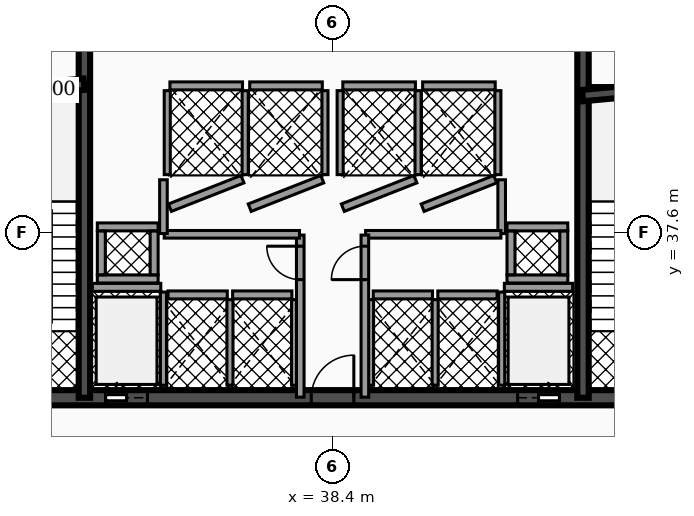
"""IFC4 building model, lengths in metres.
Left out: names, types, materials, properties, quantities, classifications, styles, units other than length and angle.
Written with IfcOpenShell. Run it as: python <this file> out.ifc"""

import sys

from ifc_helpers import new_model, si_unit, direction, frame, frame_2d, origin, place, context, subcontext, project, spatial, rectangle, extrude, element, fill, save


model = new_model("IFC4")
c1 = context("Model", 3, precision=1e-05, world=origin(), true_north=direction((0.0, 1.0)))
c2 = subcontext(c1, "Body", "Model", "MODEL_VIEW")
j1 = project(units=[si_unit("LENGTHUNIT", "METRE"), si_unit("PLANEANGLEUNIT", "RADIAN")], contexts=[c1])
p1 = place(None, origin())
s1 = spatial("IfcSite", under=j1, at=p1, CompositionType="ELEMENT")
p2 = place(p1, origin())
s2 = spatial("IfcBuilding", under=s1, at=p2, CompositionType="ELEMENT")
p3 = place(p2, frame((0.0, 0.0, 18.36)))
s3 = spatial("IfcBuildingStorey", under=s2, at=p3, CompositionType="ELEMENT", Elevation=18.36)
p4 = place(p3, frame((28.4, 33.25, 0.0), z_axis=(0.0, 0.0, 1.0), x_axis=(1.0, 0.0, 0.0)))
e1 = element("IfcWall", 1, at=p4, inside=s3, PredefinedType="SHEAR", context=c2, shape_type="SweptSolid", body=[
    extrude(rectangle(XDim=20.06, YDim=0.4, at=frame_2d((10.03, 0.0))), origin(), (0.0, 0.0, 1.0), 4.07),
])
p5 = place(p4, frame((4.03, 0.0, 0.0)))
e2 = element("IfcOpeningElement", 2, at=p5, cuts=e1, PredefinedType="OPENING", context=c2, shape_type="SweptSolid", body=[
    extrude(rectangle(XDim=1.1, YDim=2.15, at=frame_2d((0.55, 1.075))), frame((0.0, 0.21, 0.0), z_axis=(0.0, -1.0, 0.0), x_axis=(1.0, 0.0, 0.0)), (0.0, 0.0, 1.0), 0.42),
])
p6 = place(p4, frame((14.87, 0.0, 0.0)))
e3 = element("IfcOpeningElement", 3, at=p6, cuts=e1, PredefinedType="OPENING", context=c2, shape_type="SweptSolid", body=[
    extrude(rectangle(XDim=1.1, YDim=2.15, at=frame_2d((0.55, 1.075))), frame((0.0, 0.21, 0.0), z_axis=(0.0, -1.0, 0.0), x_axis=(1.0, 0.0, 0.0)), (0.0, 0.0, 1.0), 0.42),
])
p7 = place(p4, frame((1.31, 0.0, 0.0)))
e4 = element("IfcOpeningElement", 4, at=p7, cuts=e1, PredefinedType="OPENING", context=c2, shape_type="SweptSolid", body=[
    extrude(rectangle(XDim=1.1, YDim=2.2, at=frame_2d((0.55, 1.1))), frame((0.0, 0.21, 0.0), z_axis=(0.0, -1.0, 0.0), x_axis=(1.0, 0.0, 0.0)), (0.0, 0.0, 1.0), 0.42),
])
p8 = place(p4, frame((9.44, 0.0, 0.0)))
e5 = element("IfcOpeningElement", 5, at=p8, cuts=e1, PredefinedType="OPENING", context=c2, shape_type="SweptSolid", body=[
    extrude(rectangle(XDim=1.12, YDim=2.05, at=frame_2d((0.56, 1.025))), frame((0.0, 0.21, 0.0), z_axis=(0.0, -1.0, 0.0), x_axis=(1.0, 0.0, 0.0)), (0.0, 0.0, 1.0), 0.42),
])
p9 = place(p4, frame((17.65, 0.0, 0.0)))
e6 = element("IfcOpeningElement", 6, at=p9, cuts=e1, PredefinedType="OPENING", context=c2, shape_type="SweptSolid", body=[
    extrude(rectangle(XDim=1.1, YDim=2.2, at=frame_2d((0.55, 1.1))), frame((0.0, 0.21, 0.0), z_axis=(0.0, -1.0, 0.0), x_axis=(1.0, 0.0, 0.0)), (0.0, 0.0, 1.0), 0.42),
])
for number, where, z_axis, x_axis in (
    (7, (31.87, 33.25, 0.0), (0.0, 0.0, 1.0), (0.0, 1.0, 0.0)),
    (8, (44.99, 33.25, 0.0), (0.0, 0.0, 1.0), (0.0, 1.0, 0.0)),
):
    element("IfcWall", number, at=place(p3, frame(where, z_axis=z_axis, x_axis=x_axis)), inside=s3, PredefinedType="SHEAR", context=c2, shape_type="SweptSolid", body=[
        extrude(rectangle(XDim=10.2, YDim=0.3, at=frame_2d((5.1, 0.0))), origin(), (0.0, 0.0, 1.0), 4.07),
    ])
p10 = place(p3, frame((28.64, 41.2, 0.0), z_axis=(0.0, 0.0, 1.0), x_axis=(0.995687118776, 0.092774789157, 0.0)))
e9 = element("IfcWall", 9, at=p10, inside=s3, PredefinedType="SHEAR", context=c2, shape_type="SweptSolid", body=[
    extrude(rectangle(XDim=3.234, YDim=0.3, at=frame_2d((1.617, 0.0))), origin(), (0.0, 0.0, 1.0), 4.07),
])
p11 = place(p3, frame((44.98, 41.2, 0.0), z_axis=(0.0, 0.0, 1.0), x_axis=(0.995686468965, 0.09278176286, 0.0)))
e10 = element("IfcWall", 10, at=p11, inside=s3, PredefinedType="SHEAR", context=c2, shape_type="SweptSolid", body=[
    extrude(rectangle(XDim=3.234, YDim=0.3, at=frame_2d((1.617, 0.0))), origin(), (0.0, 0.0, 1.0), 4.07),
])
p12 = place(p3, frame((32.08, 36.155, 0.0), z_axis=(0.0, 0.0, 1.0), x_axis=(1.0, 0.0, 0.0)))
e11 = element("IfcWall", 11, at=p12, inside=s3, PredefinedType="SOLIDWALL", context=c2, shape_type="SweptSolid", body=[
    extrude(rectangle(XDim=1.8, YDim=0.21, at=frame_2d((0.9, 0.0))), origin(), (0.0, 0.0, 1.0), 3.042),
])
p13 = place(p3, frame((33.95, 33.58, 0.0), z_axis=(0.0, 0.0, 1.0), x_axis=(0.0, 1.0, 0.0)))
e12 = element("IfcWall", 12, at=p13, inside=s3, PredefinedType="SOLIDWALL", context=c2, shape_type="SweptSolid", body=[
    extrude(rectangle(XDim=2.45, YDim=0.16, at=frame_2d((1.225, 0.0))), origin(), (0.0, 0.0, 1.0), 3.042),
])
p14 = place(p3, frame((42.92, 36.155, 0.0), z_axis=(0.0, 0.0, 1.0), x_axis=(1.0, 0.0, 0.0)))
e13 = element("IfcWall", 13, at=p14, inside=s3, PredefinedType="SOLIDWALL", context=c2, shape_type="SweptSolid", body=[
    extrude(rectangle(XDim=1.8, YDim=0.21, at=frame_2d((0.9, 0.0))), origin(), (0.0, 0.0, 1.0), 3.042),
])
p15 = place(p3, frame((42.85, 33.58, 0.0), z_axis=(0.0, 0.0, 1.0), x_axis=(0.0, 1.0, 0.0)))
e14 = element("IfcWall", 14, at=p15, inside=s3, PredefinedType="SOLIDWALL", context=c2, shape_type="SweptSolid", body=[
    extrude(rectangle(XDim=2.45, YDim=0.16, at=frame_2d((1.225, 0.0))), origin(), (0.0, 0.0, 1.0), 3.042),
])
p16 = place(p3, frame((34.12, 38.25, 0.0), z_axis=(0.0, 0.0, 1.0), x_axis=(0.930804993012, 0.36551616241, 0.0)))
e15 = element("IfcWall", 15, at=p16, inside=s3, PredefinedType="SOLIDWALL", context=c2, shape_type="SweptSolid", body=[
    extrude(rectangle(XDim=2.052, YDim=0.21, at=frame_2d((1.026, 0.0))), origin(), (0.0, 0.0, 1.0), 3.042),
])
p17 = place(p3, frame((34.12, 41.455, 0.0), z_axis=(0.0, 0.0, 1.0), x_axis=(1.0, 0.0, 0.0)))
e16 = element("IfcWall", 16, at=p17, inside=s3, PredefinedType="SOLIDWALL", context=c2, shape_type="SweptSolid", body=[
    extrude(rectangle(XDim=1.91, YDim=0.21, at=frame_2d((0.955, 0.0))), origin(), (0.0, 0.0, 1.0), 3.042),
])
for number, where, z_axis, x_axis in (
    (17, (34.05, 39.12, 0.0), (0.0, 0.0, 1.0), (0.0, 1.0, 0.0)),
    (18, (36.1, 39.12, 0.0), (0.0, 0.0, 1.0), (0.0, 1.0, 0.0)),
):
    element("IfcWall", number, at=place(p3, frame(where, z_axis=z_axis, x_axis=x_axis)), inside=s3, PredefinedType="SOLIDWALL", context=c2, shape_type="SweptSolid", body=[
        extrude(rectangle(XDim=2.21, YDim=0.16, at=frame_2d((1.105, 0.0))), origin(), (0.0, 0.0, 1.0), 3.042),
    ])
p18 = place(p3, frame((36.22, 38.25, 0.0), z_axis=(0.0, 0.0, 1.0), x_axis=(0.930804993012, 0.36551616241, 0.0)))
e19 = element("IfcWall", 19, at=p18, inside=s3, PredefinedType="SOLIDWALL", context=c2, shape_type="SweptSolid", body=[
    extrude(rectangle(XDim=2.052, YDim=0.21, at=frame_2d((1.026, 0.0))), origin(), (0.0, 0.0, 1.0), 3.042),
])
p19 = place(p3, frame((36.22, 41.455, 0.0), z_axis=(0.0, 0.0, 1.0), x_axis=(1.0, 0.0, 0.0)))
e20 = element("IfcWall", 20, at=p19, inside=s3, PredefinedType="SOLIDWALL", context=c2, shape_type="SweptSolid", body=[
    extrude(rectangle(XDim=1.91, YDim=0.21, at=frame_2d((0.955, 0.0))), origin(), (0.0, 0.0, 1.0), 3.042),
])
p20 = place(p3, frame((38.2, 39.12, 0.0), z_axis=(0.0, 0.0, 1.0), x_axis=(0.0, 1.0, 0.0)))
e21 = element("IfcWall", 21, at=p20, inside=s3, PredefinedType="SOLIDWALL", context=c2, shape_type="SweptSolid", body=[
    extrude(rectangle(XDim=2.21, YDim=0.16, at=frame_2d((1.105, 0.0))), origin(), (0.0, 0.0, 1.0), 3.042),
])
p21 = place(p3, frame((38.67, 38.25, 0.0), z_axis=(0.0, 0.0, 1.0), x_axis=(0.930820886763, 0.3654756856, 0.0)))
e22 = element("IfcWall", 22, at=p21, inside=s3, PredefinedType="SOLIDWALL", context=c2, shape_type="SweptSolid", body=[
    extrude(rectangle(XDim=2.052, YDim=0.21, at=frame_2d((1.026, 0.0))), origin(), (0.0, 0.0, 1.0), 3.042),
])
p22 = place(p3, frame((38.67, 41.455, 0.0), z_axis=(0.0, 0.0, 1.0), x_axis=(1.0, 0.0, 0.0)))
e23 = element("IfcWall", 23, at=p22, inside=s3, PredefinedType="SOLIDWALL", context=c2, shape_type="SweptSolid", body=[
    extrude(rectangle(XDim=1.91, YDim=0.21, at=frame_2d((0.955, 0.0))), origin(), (0.0, 0.0, 1.0), 3.042),
])
for number, where, z_axis, x_axis in (
    (24, (38.6, 39.12, 0.0), (0.0, 0.0, 1.0), (0.0, 1.0, 0.0)),
    (25, (40.65, 39.12, 0.0), (0.0, 0.0, 1.0), (0.0, 1.0, 0.0)),
):
    element("IfcWall", number, at=place(p3, frame(where, z_axis=z_axis, x_axis=x_axis)), inside=s3, PredefinedType="SOLIDWALL", context=c2, shape_type="SweptSolid", body=[
        extrude(rectangle(XDim=2.21, YDim=0.16, at=frame_2d((1.105, 0.0))), origin(), (0.0, 0.0, 1.0), 3.042),
    ])
p23 = place(p3, frame((40.77, 38.25, 0.0), z_axis=(0.0, 0.0, 1.0), x_axis=(0.930804993012, 0.36551616241, 0.0)))
e26 = element("IfcWall", 26, at=p23, inside=s3, PredefinedType="SOLIDWALL", context=c2, shape_type="SweptSolid", body=[
    extrude(rectangle(XDim=2.052, YDim=0.21, at=frame_2d((1.026, 0.0))), origin(), (0.0, 0.0, 1.0), 3.042),
])
p24 = place(p3, frame((40.77, 41.455, 0.0), z_axis=(0.0, 0.0, 1.0), x_axis=(1.0, 0.0, 0.0)))
e27 = element("IfcWall", 27, at=p24, inside=s3, PredefinedType="SOLIDWALL", context=c2, shape_type="SweptSolid", body=[
    extrude(rectangle(XDim=1.91, YDim=0.21, at=frame_2d((0.955, 0.0))), origin(), (0.0, 0.0, 1.0), 3.042),
])
p25 = place(p3, frame((42.75, 39.12, 0.0), z_axis=(0.0, 0.0, 1.0), x_axis=(0.0, 1.0, 0.0)))
e28 = element("IfcWall", 28, at=p25, inside=s3, PredefinedType="SOLIDWALL", context=c2, shape_type="SweptSolid", body=[
    extrude(rectangle(XDim=2.21, YDim=0.16, at=frame_2d((1.105, 0.0))), origin(), (0.0, 0.0, 1.0), 3.042),
])
p26 = place(p3, frame((34.07, 35.955, 0.0), z_axis=(0.0, 0.0, 1.0), x_axis=(1.0, 0.0, 0.0)))
e29 = element("IfcWall", 29, at=p26, inside=s3, PredefinedType="SOLIDWALL", context=c2, shape_type="SweptSolid", body=[
    extrude(rectangle(XDim=1.56, YDim=0.21, at=frame_2d((0.78, 0.0))), origin(), (0.0, 0.0, 1.0), 3.042),
])
p27 = place(p3, frame((35.7, 33.58, 0.0), z_axis=(0.0, 0.0, 1.0), x_axis=(0.0, 1.0, 0.0)))
e30 = element("IfcWall", 30, at=p27, inside=s3, PredefinedType="SOLIDWALL", context=c2, shape_type="SweptSolid", body=[
    extrude(rectangle(XDim=2.25, YDim=0.16, at=frame_2d((1.125, 0.0))), origin(), (0.0, 0.0, 1.0), 3.042),
])
p28 = place(p3, frame((35.77, 35.955, 0.0), z_axis=(0.0, 0.0, 1.0), x_axis=(1.0, 0.0, 0.0)))
e31 = element("IfcWall", 31, at=p28, inside=s3, PredefinedType="SOLIDWALL", context=c2, shape_type="SweptSolid", body=[
    extrude(rectangle(XDim=1.56, YDim=0.21, at=frame_2d((0.78, 0.0))), origin(), (0.0, 0.0, 1.0), 3.042),
])
p29 = place(p3, frame((37.4, 33.58, 0.0), z_axis=(0.0, 0.0, 1.0), x_axis=(0.0, 1.0, 0.0)))
e32 = element("IfcWall", 32, at=p29, inside=s3, PredefinedType="SOLIDWALL", context=c2, shape_type="SweptSolid", body=[
    extrude(rectangle(XDim=2.25, YDim=0.16, at=frame_2d((1.125, 0.0))), origin(), (0.0, 0.0, 1.0), 3.042),
])
p30 = place(p3, frame((39.47, 35.955, 0.0), z_axis=(0.0, 0.0, 1.0), x_axis=(1.0, 0.0, 0.0)))
e33 = element("IfcWall", 33, at=p30, inside=s3, PredefinedType="SOLIDWALL", context=c2, shape_type="SweptSolid", body=[
    extrude(rectangle(XDim=1.56, YDim=0.21, at=frame_2d((0.78, 0.0))), origin(), (0.0, 0.0, 1.0), 3.042),
])
for number, where, z_axis, x_axis in (
    (34, (39.4, 33.58, 0.0), (0.0, 0.0, 1.0), (0.0, 1.0, 0.0)),
    (35, (41.1, 33.58, 0.0), (0.0, 0.0, 1.0), (0.0, 1.0, 0.0)),
):
    element("IfcWall", number, at=place(p3, frame(where, z_axis=z_axis, x_axis=x_axis)), inside=s3, PredefinedType="SOLIDWALL", context=c2, shape_type="SweptSolid", body=[
        extrude(rectangle(XDim=2.25, YDim=0.16, at=frame_2d((1.125, 0.0))), origin(), (0.0, 0.0, 1.0), 3.042),
    ])
p31 = place(p3, frame((41.17, 35.955, 0.0), z_axis=(0.0, 0.0, 1.0), x_axis=(1.0, 0.0, 0.0)))
e36 = element("IfcWall", 36, at=p31, inside=s3, PredefinedType="SOLIDWALL", context=c2, shape_type="SweptSolid", body=[
    extrude(rectangle(XDim=1.56, YDim=0.21, at=frame_2d((0.78, 0.0))), origin(), (0.0, 0.0, 1.0), 3.042),
])
for number, where, z_axis, x_axis in (
    (37, (32.21, 36.375, 0.0), (0.0, 0.0, 1.0), (1.0, 0.0, 0.0)),
    (38, (32.21, 37.745, 0.0), (0.0, 0.0, 1.0), (1.0, 0.0, 0.0)),
):
    element("IfcWall", number, at=place(p3, frame(where, z_axis=z_axis, x_axis=x_axis)), inside=s3, PredefinedType="SOLIDWALL", context=c2, shape_type="SweptSolid", body=[
        extrude(rectangle(XDim=1.6, YDim=0.21, at=frame_2d((0.8, 0.0))), origin(), (0.0, 0.0, 1.0), 4.07),
    ])
for number, where, z_axis, x_axis in (
    (39, (32.315, 36.485, 0.0), (0.0, 0.0, 1.0), (0.0, 1.0, 0.0)),
    (40, (33.705, 36.485, 0.0), (0.0, 0.0, 1.0), (0.0, 1.0, 0.0)),
):
    element("IfcWall", number, at=place(p3, frame(where, z_axis=z_axis, x_axis=x_axis)), inside=s3, PredefinedType="SOLIDWALL", context=c2, shape_type="SweptSolid", body=[
        extrude(rectangle(XDim=1.15, YDim=0.21, at=frame_2d((0.575, 0.0))), origin(), (0.0, 0.0, 1.0), 4.07),
    ])
for number, where, z_axis, x_axis in (
    (41, (42.99, 36.375, 0.0), (0.0, 0.0, 1.0), (1.0, 0.0, 0.0)),
    (42, (42.99, 37.745, 0.0), (0.0, 0.0, 1.0), (1.0, 0.0, 0.0)),
):
    element("IfcWall", number, at=place(p3, frame(where, z_axis=z_axis, x_axis=x_axis)), inside=s3, PredefinedType="SOLIDWALL", context=c2, shape_type="SweptSolid", body=[
        extrude(rectangle(XDim=1.6, YDim=0.21, at=frame_2d((0.8, 0.0))), origin(), (0.0, 0.0, 1.0), 4.07),
    ])
for number, where, z_axis, x_axis in (
    (43, (43.095, 36.485, 0.0), (0.0, 0.0, 1.0), (0.0, 1.0, 0.0)),
    (44, (44.485, 36.485, 0.0), (0.0, 0.0, 1.0), (0.0, 1.0, 0.0)),
):
    element("IfcWall", number, at=place(p3, frame(where, z_axis=z_axis, x_axis=x_axis)), inside=s3, PredefinedType="SOLIDWALL", context=c2, shape_type="SweptSolid", body=[
        extrude(rectangle(XDim=1.15, YDim=0.21, at=frame_2d((0.575, 0.0))), origin(), (0.0, 0.0, 1.0), 4.07),
    ])
p32 = place(p3, frame((37.55, 33.265, 0.0), z_axis=(0.0, 0.0, 1.0), x_axis=(0.0, 1.0, 0.0)))
e45 = element("IfcWall", 45, at=p32, inside=s3, PredefinedType="PARTITIONING", context=c2, shape_type="SweptSolid", body=[
    extrude(rectangle(XDim=4.265, YDim=0.2, at=frame_2d((2.133, 0.0))), origin(), (0.0, 0.0, 1.0), 3.027),
])
p33 = place(p32, frame((3.093, 0.0, 0.0)))
e46 = element("IfcOpeningElement", 46, at=p33, cuts=e45, PredefinedType="OPENING", context=c2, shape_type="SweptSolid", body=[
    extrude(rectangle(XDim=0.88, YDim=2.05, at=frame_2d((0.44, 1.025))), frame((0.0, 0.11, 0.0), z_axis=(0.0, -1.0, 0.0), x_axis=(1.0, 0.0, 0.0)), (0.0, 0.0, 1.0), 0.22),
])
p34 = place(p3, frame((33.97, 37.55, 0.0), z_axis=(0.0, 0.0, 1.0), x_axis=(1.0, 0.0, 0.0)))
e47 = element("IfcWall", 47, at=p34, inside=s3, PredefinedType="PARTITIONING", context=c2, shape_type="SweptSolid", body=[
    extrude(rectangle(XDim=3.56, YDim=0.2, at=frame_2d((1.78, 0.0))), origin(), (0.0, 0.0, 1.0), 3.027),
])
for number, where, z_axis, x_axis in (
    (48, (33.95, 37.57, 0.0), (0.0, 0.0, 1.0), (0.0, 1.0, 0.0)),
    (49, (42.85, 37.57, 0.0), (0.0, 0.0, 1.0), (0.0, 1.0, 0.0)),
):
    element("IfcWall", number, at=place(p3, frame(where, z_axis=z_axis, x_axis=x_axis)), inside=s3, PredefinedType="PARTITIONING", context=c2, shape_type="SweptSolid", body=[
        extrude(rectangle(XDim=1.415, YDim=0.2, at=frame_2d((0.708, 0.0))), origin(), (0.0, 0.0, 1.0), 3.027),
    ])
p35 = place(p3, frame((39.27, 37.55, 0.0), z_axis=(0.0, 0.0, 1.0), x_axis=(1.0, 0.0, 0.0)))
e50 = element("IfcWall", 50, at=p35, inside=s3, PredefinedType="PARTITIONING", context=c2, shape_type="SweptSolid", body=[
    extrude(rectangle(XDim=3.56, YDim=0.2, at=frame_2d((1.78, 0.0))), origin(), (0.0, 0.0, 1.0), 3.027),
])
p36 = place(p3, frame((39.25, 33.265, 0.0), z_axis=(0.0, 0.0, 1.0), x_axis=(0.0, 1.0, 0.0)))
e51 = element("IfcWall", 51, at=p36, inside=s3, PredefinedType="PARTITIONING", context=c2, shape_type="SweptSolid", body=[
    extrude(rectangle(XDim=4.265, YDim=0.2, at=frame_2d((2.133, 0.0))), origin(), (0.0, 0.0, 1.0), 3.027),
])
p37 = place(p36, frame((3.093, 0.0, 0.0)))
e52 = element("IfcOpeningElement", 52, at=p37, cuts=e51, PredefinedType="OPENING", context=c2, shape_type="SweptSolid", body=[
    extrude(rectangle(XDim=0.88, YDim=2.05, at=frame_2d((0.44, 1.025))), frame((0.0, 0.11, 0.0), z_axis=(0.0, -1.0, 0.0), x_axis=(1.0, 0.0, 0.0)), (0.0, 0.0, 1.0), 0.22),
])
p38 = place(p5, origin())
e53 = element("IfcDoor", 53, at=p38, inside=s3, OperationType="SLIDING_TO_LEFT", PredefinedType="DOOR", context=c2, shape_type="SweptSolid", body=[
    extrude(rectangle(XDim=1.1, YDim=2.15, at=frame_2d((0.55, 1.075))), frame((0.0, 0.025, 0.0), z_axis=(0.0, -1.0, 0.0), x_axis=(1.0, 0.0, 0.0)), (0.0, 0.0, 1.0), 0.05),
])
fill(e2, e53)
p39 = place(p6, origin())
e54 = element("IfcDoor", 54, at=p39, inside=s3, OperationType="SLIDING_TO_RIGHT", PredefinedType="DOOR", context=c2, shape_type="SweptSolid", body=[
    extrude(rectangle(XDim=1.1, YDim=2.15, at=frame_2d((0.55, 1.075))), frame((0.0, 0.025, 0.0), z_axis=(0.0, -1.0, 0.0), x_axis=(1.0, 0.0, 0.0)), (0.0, 0.0, 1.0), 0.05),
])
fill(e3, e54)
p40 = place(p8, origin())
e55 = element("IfcDoor", 55, at=p40, inside=s3, OperationType="SINGLE_SWING_RIGHT", PredefinedType="DOOR", context=c2, shape_type="SweptSolid", body=[
    extrude(rectangle(XDim=1.12, YDim=2.05, at=frame_2d((0.56, 1.025))), frame((0.0, 0.025, 0.0), z_axis=(0.0, -1.0, 0.0), x_axis=(1.0, 0.0, 0.0)), (0.0, 0.0, 1.0), 0.05),
])
fill(e5, e55)
p41 = place(p33, origin())
e56 = element("IfcDoor", 56, at=p41, inside=s3, OperationType="SINGLE_SWING_RIGHT", PredefinedType="DOOR", context=c2, shape_type="SweptSolid", body=[
    extrude(rectangle(XDim=0.88, YDim=2.05, at=frame_2d((0.44, 1.025))), frame((0.0, 0.025, 0.0), z_axis=(0.0, -1.0, 0.0), x_axis=(1.0, 0.0, 0.0)), (0.0, 0.0, 1.0), 0.05),
])
fill(e46, e56)
p42 = place(p37, origin())
e57 = element("IfcDoor", 57, at=p42, inside=s3, OperationType="SINGLE_SWING_LEFT", PredefinedType="DOOR", context=c2, shape_type="SweptSolid", body=[
    extrude(rectangle(XDim=0.88, YDim=2.05, at=frame_2d((0.44, 1.025))), frame((0.0, 0.025, 0.0), z_axis=(0.0, -1.0, 0.0), x_axis=(1.0, 0.0, 0.0)), (0.0, 0.0, 1.0), 0.05),
])
fill(e52, e57)
save(model, sys.argv[1])
